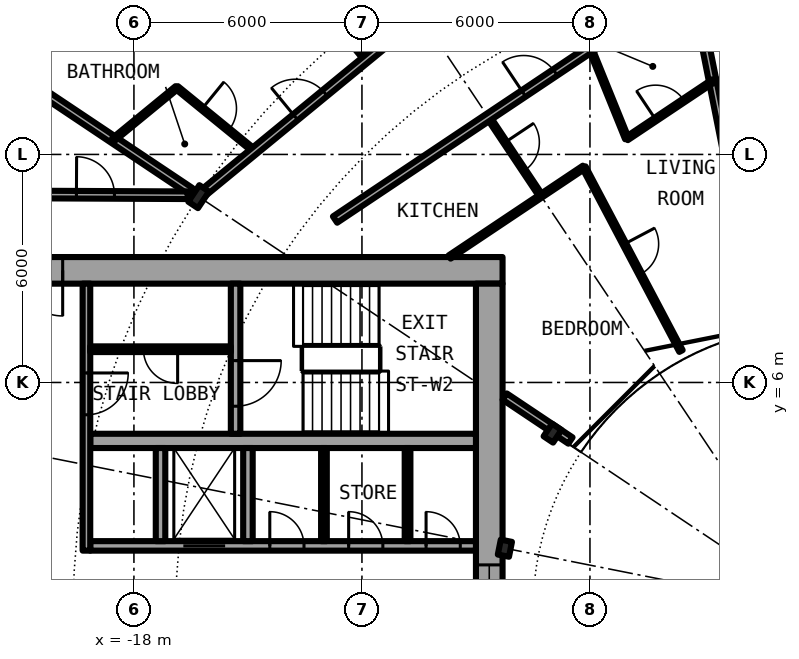
"""IFC4 building model, lengths in metres.
Left out: names, types, materials, properties, quantities, classifications, styles, units other than length and angle.
Written with IfcOpenShell. Run it as: python <this file> out.ifc"""

import sys

from ifc_helpers import new_model, si_unit, direction, frame, frame_2d, origin, origin_2d, place, context, subcontext, project, spatial, rectangle, i_section, extrude, element, fill, save


model = new_model("IFC4")
c1 = context("Model", 3, precision=1e-05, world=origin(), true_north=direction((0.0, 1.0)))
c2 = subcontext(c1, "Body", "Model", "MODEL_VIEW")
j1 = project(units=[si_unit("LENGTHUNIT", "METRE"), si_unit("PLANEANGLEUNIT", "RADIAN")], contexts=[c1])
p1 = place(None, origin())
s1 = spatial("IfcSite", under=j1, at=p1, CompositionType="ELEMENT")
p2 = place(p1, origin())
s2 = spatial("IfcBuilding", under=s1, at=p2, CompositionType="ELEMENT")
p3 = place(p2, frame((0.0, 0.0, 88.0)))
s3 = spatial("IfcBuildingStorey", under=s2, at=p3, CompositionType="ELEMENT", Elevation=88.0)
p4 = place(p3, frame((-16.297, 10.889, 0.0), z_axis=(0.0, 0.0, 1.0), x_axis=(-0.831469612303, 0.55557023302, 0.0)))
e1 = element("IfcColumn", 1, at=p4, inside=s3, PredefinedType="COLUMN", context=c2, shape_type="SweptSolid", body=[
    extrude(i_section(OverallWidth=0.306, OverallDepth=0.524, WebThickness=0.021, FlangeThickness=0.04, FilletRadius=0.027, at=origin_2d()), origin(), (0.0, 0.0, 1.0), 3.05),
])
for number, where, z_axis, x_axis in (
    (2, (-6.984, 4.667, 0.0), (0.0, 0.0, 1.0), (-0.831, 0.556, 0.0)),
    (3, (-8.239, 1.639, 0.0), (0.0, 0.0, 1.0), (-0.981, 0.195, 0.0)),
):
    element("IfcColumn", number, at=place(p3, frame(where, z_axis=z_axis, x_axis=x_axis)), inside=s3, PredefinedType="COLUMN", context=c2, shape_type="SweptSolid", body=[
        extrude(i_section(OverallWidth=0.3, OverallDepth=0.4, WebThickness=0.013, FlangeThickness=0.024, FilletRadius=0.027, at=origin_2d()), origin(), (0.0, 0.0, 1.0), 3.05),
    ])
p5 = place(p3, frame((-8.3, 8.95, 0.0), z_axis=(0.0, 0.0, 1.0), x_axis=(-1.0, 0.0, 0.0)))
e4 = element("IfcWall", 4, at=p5, inside=s3, PredefinedType="SHEAR", context=c2, shape_type="SweptSolid", body=[
    extrude(rectangle(XDim=14.0, YDim=0.7, at=frame_2d((7.0, 0.0))), origin(), (0.0, 0.0, 1.0), 3.05),
])
p6 = place(p5, frame((11.575, 0.0, 0.0)))
e5 = element("IfcOpeningElement", 5, at=p6, cuts=e4, PredefinedType="OPENING", context=c2, shape_type="SweptSolid", body=[
    extrude(rectangle(XDim=1.2, YDim=2.3, at=frame_2d((0.6, 1.15))), frame((0.0, 0.36, 0.0), z_axis=(0.0, -1.0, 0.0), x_axis=(1.0, 0.0, 0.0)), (0.0, 0.0, 1.0), 0.72),
])
p7 = place(p3, frame((-8.65, 8.6, 0.0), z_axis=(0.0, 0.0, 1.0), x_axis=(0.0, -1.0, 0.0)))
e6 = element("IfcWall", 6, at=p7, inside=s3, PredefinedType="SHEAR", context=c2, shape_type="SweptSolid", body=[
    extrude(rectangle(XDim=17.2, YDim=0.7, at=frame_2d((8.6, 0.0))), origin(), (0.0, 0.0, 1.0), 3.05),
])
p8 = place(p7, frame((7.4, 0.0, 0.1)))
e7 = element("IfcOpeningElement", 7, at=p8, cuts=e6, PredefinedType="OPENING", context=c2, shape_type="SweptSolid", body=[
    extrude(rectangle(XDim=2.4, YDim=2.2, at=frame_2d((1.2, 1.1))), frame((0.0, 0.36, 0.0), z_axis=(0.0, -1.0, 0.0), x_axis=(1.0, 0.0, 0.0)), (0.0, 0.0, 1.0), 0.72),
])
p9 = place(p3, frame((-19.15, 1.7, 0.0), z_axis=(0.0, 0.0, 1.0), x_axis=(1.0, 0.0, 0.0)))
e8 = element("IfcWall", 8, at=p9, inside=s3, PredefinedType="SHEAR", context=c2, shape_type="SweptSolid", body=[
    extrude(rectangle(XDim=10.15, YDim=0.25, at=frame_2d((5.075, 0.0))), origin(), (0.0, 0.0, 1.0), 3.05),
])
p10 = place(p9, frame((2.45, 0.0, 0.0)))
e9 = element("IfcOpeningElement", 9, at=p10, cuts=e8, PredefinedType="OPENING", context=c2, shape_type="SweptSolid", body=[
    extrude(rectangle(XDim=1.1, YDim=2.3, at=frame_2d((0.55, 1.15))), frame((0.0, 0.135, 0.0), z_axis=(0.0, -1.0, 0.0), x_axis=(1.0, 0.0, 0.0)), (0.0, 0.0, 1.0), 0.27),
])
p11 = place(p9, frame((8.837, 0.0, 0.0)))
e10 = element("IfcOpeningElement", 10, at=p11, cuts=e8, PredefinedType="OPENING", context=c2, shape_type="SweptSolid", body=[
    extrude(rectangle(XDim=0.9, YDim=2.3, at=frame_2d((0.45, 1.15))), frame((0.0, 0.135, 0.0), z_axis=(0.0, -1.0, 0.0), x_axis=(1.0, 0.0, 0.0)), (0.0, 0.0, 1.0), 0.27),
])
p12 = place(p9, frame((6.8, 0.0, 0.0)))
e11 = element("IfcOpeningElement", 11, at=p12, cuts=e8, PredefinedType="OPENING", context=c2, shape_type="SweptSolid", body=[
    extrude(rectangle(XDim=0.9, YDim=2.3, at=frame_2d((0.45, 1.15))), frame((0.0, 0.135, 0.0), z_axis=(0.0, -1.0, 0.0), x_axis=(1.0, 0.0, 0.0)), (0.0, 0.0, 1.0), 0.27),
])
p13 = place(p9, frame((4.725, 0.0, 0.0)))
e12 = element("IfcOpeningElement", 12, at=p13, cuts=e8, PredefinedType="OPENING", context=c2, shape_type="SweptSolid", body=[
    extrude(rectangle(XDim=0.9, YDim=2.3, at=frame_2d((0.45, 1.15))), frame((0.0, 0.135, 0.0), z_axis=(0.0, -1.0, 0.0), x_axis=(1.0, 0.0, 0.0)), (0.0, 0.0, 1.0), 0.27),
])
p14 = place(p3, frame((-9.0, 4.462, 0.0), z_axis=(0.0, 0.0, 1.0), x_axis=(-1.0, 0.0, 0.0)))
e13 = element("IfcWall", 13, at=p14, inside=s3, PredefinedType="SHEAR", context=c2, shape_type="SweptSolid", body=[
    extrude(rectangle(XDim=10.15, YDim=0.375, at=frame_2d((5.075, 0.0))), origin(), (0.0, 0.0, 1.0), 3.05),
])
p15 = place(p3, frame((-15.325, 8.6, 0.0), z_axis=(0.0, 0.0, 1.0), x_axis=(0.0, -1.0, 0.0)))
e14 = element("IfcWall", 14, at=p15, inside=s3, PredefinedType="SHEAR", context=c2, shape_type="SweptSolid", body=[
    extrude(rectangle(XDim=3.95, YDim=0.25, at=frame_2d((1.975, 0.0))), origin(), (0.0, 0.0, 1.0), 3.05),
])
p16 = place(p15, frame((2.025, 0.0, 0.0)))
e15 = element("IfcOpeningElement", 15, at=p16, cuts=e14, PredefinedType="OPENING", context=c2, shape_type="SweptSolid", body=[
    extrude(rectangle(XDim=1.2, YDim=2.3, at=frame_2d((0.6, 1.15))), frame((0.0, 0.135, 0.0), z_axis=(0.0, -1.0, 0.0), x_axis=(1.0, 0.0, 0.0)), (0.0, 0.0, 1.0), 0.27),
])
for number, where, z_axis, x_axis in (
    (16, (-15.0, 1.825, 0.0), (0.0, 0.0, 1.0), (0.0, 1.0, 0.0)),
    (17, (-17.3, 1.825, 0.0), (0.0, 0.0, 1.0), (0.0, 1.0, 0.0)),
):
    element("IfcWall", number, at=place(p3, frame(where, z_axis=z_axis, x_axis=x_axis)), inside=s3, PredefinedType="SOLIDWALL", context=c2, shape_type="SweptSolid", body=[
        extrude(rectangle(XDim=2.45, YDim=0.25, at=frame_2d((1.225, 0.0))), origin(), (0.0, 0.0, 1.0), 2.7),
    ])
p17 = place(p3, frame((-19.25, 8.6, 0.0), z_axis=(0.0, 0.0, 1.0), x_axis=(0.0, -1.0, 0.0)))
e18 = element("IfcWall", 18, at=p17, inside=s3, PredefinedType="SOLIDWALL", context=c2, shape_type="SweptSolid", body=[
    extrude(rectangle(XDim=7.025, YDim=0.2, at=frame_2d((3.513, 0.0))), origin(), (0.0, 0.0, 1.0), 2.7),
])
p18 = place(p17, frame((2.35, 0.0, 0.0)))
e19 = element("IfcOpeningElement", 19, at=p18, cuts=e18, PredefinedType="OPENING", context=c2, shape_type="SweptSolid", body=[
    extrude(rectangle(XDim=1.1, YDim=2.3, at=frame_2d((0.55, 1.15))), frame((0.0, 0.11, 0.0), z_axis=(0.0, -1.0, 0.0), x_axis=(1.0, 0.0, 0.0)), (0.0, 0.0, 1.0), 0.22),
])
for number, where, z_axis, x_axis in (
    (20, (-10.8, 1.825, 0.0), (0.0, 0.0, 1.0), (0.0, 1.0, 0.0)),
    (21, (-13.0, 1.825, 0.0), (0.0, 0.0, 1.0), (0.0, 1.0, 0.0)),
):
    element("IfcWall", number, at=place(p3, frame(where, z_axis=z_axis, x_axis=x_axis)), inside=s3, PredefinedType="PARTITIONING", context=c2, shape_type="SweptSolid", body=[
        extrude(rectangle(XDim=2.45, YDim=0.15, at=frame_2d((1.225, 0.0))), origin(), (0.0, 0.0, 1.0), 2.7),
    ])
p19 = place(p3, frame((-15.45, 6.875, 0.0), z_axis=(0.0, 0.0, 1.0), x_axis=(-1.0, 0.0, 0.0)))
e22 = element("IfcWall", 22, at=p19, inside=s3, PredefinedType="PARTITIONING", context=c2, shape_type="SweptSolid", body=[
    extrude(rectangle(XDim=3.7, YDim=0.15, at=frame_2d((1.85, 0.0))), origin(), (0.0, 0.0, 1.0), 2.7),
])
p20 = place(p19, frame((1.4, 0.0, 0.0)))
e23 = element("IfcOpeningElement", 23, at=p20, cuts=e22, PredefinedType="OPENING", context=c2, shape_type="SweptSolid", body=[
    extrude(rectangle(XDim=0.9, YDim=2.3, at=frame_2d((0.45, 1.15))), frame((0.0, 0.085, 0.0), z_axis=(0.0, -1.0, 0.0), x_axis=(1.0, 0.0, 0.0)), (0.0, 0.0, 1.0), 0.17),
])
p21 = place(p3, frame((-22.595, 15.098, 0.0), z_axis=(0.0, 0.0, 1.0), x_axis=(0.831382022135, -0.555701298605, 0.0)))
e24 = element("IfcWall", 24, at=p21, inside=s3, PredefinedType="PARTITIONING", context=c2, shape_type="SweptSolid", body=[
    extrude(rectangle(XDim=7.313, YDim=0.2, at=frame_2d((3.657, 0.0))), origin(), (0.0, 0.0, 1.0), 2.7),
])
p22 = place(p3, frame((-17.24, 21.007, 0.0), z_axis=(0.0, 0.0, 1.0), x_axis=(0.634396151441, -0.77300810024, 0.0)))
e25 = element("IfcWall", 25, at=p22, inside=s3, PredefinedType="PARTITIONING", context=c2, shape_type="SweptSolid", body=[
    extrude(rectangle(XDim=8.419, YDim=0.1, at=frame_2d((4.209, 0.0))), origin(), (0.0, 0.0, 1.0), 2.7),
])
p23 = place(p22, frame((6.679, 0.0, 0.0)))
e26 = element("IfcOpeningElement", 26, at=p23, cuts=e25, PredefinedType="OPENING", context=c2, shape_type="SweptSolid", body=[
    extrude(rectangle(XDim=0.9, YDim=2.3, at=frame_2d((0.45, 1.15))), frame((0.0, 0.06, 0.0), z_axis=(0.0, -1.0, 0.0), x_axis=(1.0, 0.0, 0.0)), (0.0, 0.0, 1.0), 0.12),
])
p24 = place(p22, frame((2.468, 0.0, 0.0)))
e27 = element("IfcOpeningElement", 27, at=p24, cuts=e25, PredefinedType="OPENING", context=c2, shape_type="SweptSolid", body=[
    extrude(rectangle(XDim=0.9, YDim=2.3, at=frame_2d((0.45, 1.15))), frame((0.0, 0.06, 0.0), z_axis=(0.0, -1.0, 0.0), x_axis=(1.0, 0.0, 0.0)), (0.0, 0.0, 1.0), 0.12),
])
p25 = place(p3, frame((-16.874, 13.758, 0.0), z_axis=(0.0, 0.0, 1.0), x_axis=(0.774979608522, -0.631986239072, 0.0)))
e28 = element("IfcWall", 28, at=p25, inside=s3, PredefinedType="PARTITIONING", context=c2, shape_type="SweptSolid", body=[
    extrude(rectangle(XDim=2.636, YDim=0.1, at=frame_2d((1.318, 0.0))), origin(), (0.0, 0.0, 1.0), 2.7),
])
p26 = place(p25, frame((0.868, 0.0, 0.0)))
e29 = element("IfcOpeningElement", 29, at=p26, cuts=e28, PredefinedType="OPENING", context=c2, shape_type="SweptSolid", body=[
    extrude(rectangle(XDim=0.9, YDim=2.3, at=frame_2d((0.45, 1.15))), frame((0.0, 0.06, 0.0), z_axis=(0.0, -1.0, 0.0), x_axis=(1.0, 0.0, 0.0)), (0.0, 0.0, 1.0), 0.12),
])
p27 = place(p3, frame((-8.674, 12.982, 0.0), z_axis=(0.0, 0.0, 1.0), x_axis=(0.555355163998, -0.831613276602, 0.0)))
e30 = element("IfcWall", 30, at=p27, inside=s3, PredefinedType="PARTITIONING", context=c2, shape_type="SweptSolid", body=[
    extrude(rectangle(XDim=2.494, YDim=0.1, at=frame_2d((1.247, 0.0))), origin(), (0.0, 0.0, 1.0), 2.7),
])
p28 = place(p27, frame((0.797, 0.0, 0.0)))
e31 = element("IfcOpeningElement", 31, at=p28, cuts=e30, PredefinedType="OPENING", context=c2, shape_type="SweptSolid", body=[
    extrude(rectangle(XDim=0.9, YDim=2.3, at=frame_2d((0.45, 1.15))), frame((0.0, 0.06, 0.0), z_axis=(0.0, -1.0, 0.0), x_axis=(1.0, 0.0, 0.0)), (0.0, 0.0, 1.0), 0.12),
])
p29 = place(p3, frame((-6.159, 11.663, 0.0), z_axis=(0.0, 0.0, 1.0), x_axis=(0.466976820365, -0.884269556889, 0.0)))
e32 = element("IfcWall", 32, at=p29, inside=s3, PredefinedType="PARTITIONING", context=c2, shape_type="SweptSolid", body=[
    extrude(rectangle(XDim=5.469, YDim=0.1, at=frame_2d((2.735, 0.0))), origin(), (0.0, 0.0, 1.0), 2.7),
])
p30 = place(p29, frame((2.284, 0.0, 0.0)))
e33 = element("IfcOpeningElement", 33, at=p30, cuts=e32, PredefinedType="OPENING", context=c2, shape_type="SweptSolid", body=[
    extrude(rectangle(XDim=0.9, YDim=2.3, at=frame_2d((0.45, 1.15))), frame((0.0, 0.06, 0.0), z_axis=(0.0, -1.0, 0.0), x_axis=(1.0, 0.0, 0.0)), (0.0, 0.0, 1.0), 0.12),
])
p31 = place(p3, frame((-5.986, 14.779, 0.0), z_axis=(0.0, 0.0, 1.0), x_axis=(0.375649498413, -0.926761811008, 0.0)))
e34 = element("IfcWall", 34, at=p31, inside=s3, PredefinedType="PARTITIONING", context=c2, shape_type="SweptSolid", body=[
    extrude(rectangle(XDim=2.548, YDim=0.1, at=frame_2d((1.274, 0.0))), origin(), (0.0, 0.0, 1.0), 2.7),
])
p32 = place(p3, frame((-3.297, 16.575, 0.0), z_axis=(0.0, 0.0, 1.0), x_axis=(0.195205282633, -0.980762406311, 0.0)))
e35 = element("IfcWall", 35, at=p32, inside=s3, PredefinedType="PARTITIONING", context=c2, shape_type="SweptSolid", body=[
    extrude(rectangle(XDim=8.3, YDim=0.2, at=frame_2d((4.15, 0.0))), origin(), (0.0, 0.0, 1.0), 2.7),
])
p33 = place(p3, frame((-6.513, 4.472, 0.0), z_axis=(0.0, 0.0, 1.0), x_axis=(-0.831382204863, 0.555701025225, 0.0)))
e36 = element("IfcWall", 36, at=p33, inside=s3, PredefinedType="PARTITIONING", context=c2, shape_type="SweptSolid", body=[
    extrude(rectangle(XDim=2.082, YDim=0.2, at=frame_2d((1.041, 0.0))), origin(), (0.0, 0.0, 1.0), 2.7),
])
p34 = place(p3, frame((-21.675, 10.95, 0.0), z_axis=(0.0, 0.0, 1.0), x_axis=(0.999988944514, -0.004702217579, 0.0)))
e37 = element("IfcWall", 37, at=p34, inside=s3, PredefinedType="PARTITIONING", context=c2, shape_type="SweptSolid", body=[
    extrude(rectangle(XDim=5.088, YDim=0.2, at=frame_2d((2.544, 0.0))), origin(), (0.0, 0.0, 1.0), 2.7),
])
p35 = place(p34, frame((2.162, 0.0, 0.0)))
e38 = element("IfcOpeningElement", 38, at=p35, cuts=e37, PredefinedType="OPENING", context=c2, shape_type="SweptSolid", body=[
    extrude(rectangle(XDim=1.0, YDim=2.3, at=frame_2d((0.5, 1.15))), frame((0.0, 0.11, 0.0), z_axis=(0.0, -1.0, 0.0), x_axis=(1.0, 0.0, 0.0)), (0.0, 0.0, 1.0), 0.22),
])
p36 = place(p3, frame((-9.695, 9.3, 0.0), z_axis=(0.0, 0.0, 1.0), x_axis=(0.831369521678, 0.555720000022, 0.0)))
e39 = element("IfcWall", 39, at=p36, inside=s3, PredefinedType="PARTITIONING", context=c2, shape_type="SweptSolid", body=[
    extrude(rectangle(XDim=4.252, YDim=0.1, at=frame_2d((2.126, 0.0))), origin(), (0.0, 0.0, 1.0), 2.7),
])
p37 = place(p3, frame((-5.032, 12.417, 0.0), z_axis=(0.0, 0.0, 1.0), x_axis=(0.831538390496, 0.555467285384, 0.0)))
e40 = element("IfcWall", 40, at=p37, inside=s3, PredefinedType="PARTITIONING", context=c2, shape_type="SweptSolid", body=[
    extrude(rectangle(XDim=2.717, YDim=0.1, at=frame_2d((1.358, 0.0))), origin(), (0.0, 0.0, 1.0), 2.7),
])
p38 = place(p37, frame((0.911, 0.0, 0.0)))
e41 = element("IfcOpeningElement", 41, at=p38, cuts=e40, PredefinedType="OPENING", context=c2, shape_type="SweptSolid", body=[
    extrude(rectangle(XDim=0.9, YDim=2.3, at=frame_2d((0.45, 1.15))), frame((0.0, 0.06, 0.0), z_axis=(0.0, -1.0, 0.0), x_axis=(1.0, 0.0, 0.0)), (0.0, 0.0, 1.0), 0.12),
])
p39 = place(p3, frame((-2.77, 13.926, 0.0), z_axis=(0.0, 0.0, 1.0), x_axis=(0.99880320044, -0.048909782152, 0.0)))
e42 = element("IfcWall", 42, at=p39, inside=s3, PredefinedType="PARTITIONING", context=c2, shape_type="SweptSolid", body=[
    extrude(rectangle(XDim=2.76, YDim=0.1, at=frame_2d((1.38, 0.0))), origin(), (0.0, 0.0, 1.0), 2.7),
])
p40 = place(p39, frame((0.93, 0.0, 0.0)))
e43 = element("IfcOpeningElement", 43, at=p40, cuts=e42, PredefinedType="OPENING", context=c2, shape_type="SweptSolid", body=[
    extrude(rectangle(XDim=0.9, YDim=2.3, at=frame_2d((0.45, 1.15))), frame((0.0, 0.06, 0.0), z_axis=(0.0, -1.0, 0.0), x_axis=(1.0, 0.0, 0.0)), (0.0, 0.0, 1.0), 0.12),
])
p41 = place(p3, frame((-12.708, 10.286, 0.0), z_axis=(0.0, 0.0, 1.0), x_axis=(0.831405725802, 0.555665834026, 0.0)))
e44 = element("IfcWall", 44, at=p41, inside=s3, PredefinedType="PARTITIONING", context=c2, shape_type="SweptSolid", body=[
    extrude(rectangle(XDim=11.314, YDim=0.2, at=frame_2d((5.657, 0.0))), origin(), (0.0, 0.0, 1.0), 2.7),
])
p42 = place(p41, frame((5.969, 0.0, 0.0)))
e45 = element("IfcOpeningElement", 45, at=p42, cuts=e44, PredefinedType="OPENING", context=c2, shape_type="SweptSolid", body=[
    extrude(rectangle(XDim=1.0, YDim=2.3, at=frame_2d((0.5, 1.15))), frame((0.0, 0.11, 0.0), z_axis=(0.0, -1.0, 0.0), x_axis=(1.0, 0.0, 0.0)), (0.0, 0.0, 1.0), 0.22),
])
p43 = place(p3, frame((-16.173, 10.991, 0.0), z_axis=(0.0, 0.0, 1.0), x_axis=(0.773049018445, 0.634346289562, 0.0)))
e46 = element("IfcWall", 46, at=p43, inside=s3, PredefinedType="PARTITIONING", context=c2, shape_type="SweptSolid", body=[
    extrude(rectangle(XDim=11.219, YDim=0.2, at=frame_2d((5.61, 0.0))), origin(), (0.0, 0.0, 1.0), 2.38),
])
p44 = place(p43, frame((3.135, 0.0, 0.0)))
e47 = element("IfcOpeningElement", 47, at=p44, cuts=e46, PredefinedType="OPENING", context=c2, shape_type="SweptSolid", body=[
    extrude(rectangle(XDim=1.0, YDim=2.3, at=frame_2d((0.5, 1.15))), frame((0.0, 0.11, 0.0), z_axis=(0.0, -1.0, 0.0), x_axis=(1.0, 0.0, 0.0)), (0.0, 0.0, 1.0), 0.22),
])
p45 = place(p3, frame((-18.542, 12.389, 0.0), z_axis=(0.0, 0.0, 1.0), x_axis=(0.772948171844, 0.634469166818, 0.0)))
e48 = element("IfcWall", 48, at=p45, inside=s3, PredefinedType="PARTITIONING", context=c2, shape_type="SweptSolid", body=[
    extrude(rectangle(XDim=2.158, YDim=0.1, at=frame_2d((1.079, 0.0))), origin(), (0.0, 0.0, 1.0), 2.7),
])
p46 = place(p10, origin())
e49 = element("IfcDoor", 49, at=p46, inside=s3, OperationType="DOUBLE_DOOR_SLIDING", PredefinedType="DOOR", context=c2, shape_type="SweptSolid", body=[
    extrude(rectangle(XDim=1.1, YDim=2.3, at=frame_2d((0.55, 1.15))), frame((0.0, 0.025, 0.0), z_axis=(0.0, -1.0, 0.0), x_axis=(1.0, 0.0, 0.0)), (0.0, 0.0, 1.0), 0.05),
])
fill(e9, e49)
p47 = place(p11, origin())
e50 = element("IfcDoor", 50, at=p47, inside=s3, OperationType="SINGLE_SWING_LEFT", PredefinedType="DOOR", context=c2, shape_type="SweptSolid", body=[
    extrude(rectangle(XDim=0.9, YDim=2.3, at=frame_2d((0.45, 1.15))), frame((0.0, 0.025, 0.0), z_axis=(0.0, -1.0, 0.0), x_axis=(1.0, 0.0, 0.0)), (0.0, 0.0, 1.0), 0.05),
])
fill(e10, e50)
p48 = place(p12, origin())
e51 = element("IfcDoor", 51, at=p48, inside=s3, OperationType="SINGLE_SWING_LEFT", PredefinedType="DOOR", context=c2, shape_type="SweptSolid", body=[
    extrude(rectangle(XDim=0.9, YDim=2.3, at=frame_2d((0.45, 1.15))), frame((0.0, 0.025, 0.0), z_axis=(0.0, -1.0, 0.0), x_axis=(1.0, 0.0, 0.0)), (0.0, 0.0, 1.0), 0.05),
])
fill(e11, e51)
p49 = place(p13, origin())
e52 = element("IfcDoor", 52, at=p49, inside=s3, OperationType="SINGLE_SWING_LEFT", PredefinedType="DOOR", context=c2, shape_type="SweptSolid", body=[
    extrude(rectangle(XDim=0.9, YDim=2.3, at=frame_2d((0.45, 1.15))), frame((0.0, 0.025, 0.0), z_axis=(0.0, -1.0, 0.0), x_axis=(1.0, 0.0, 0.0)), (0.0, 0.0, 1.0), 0.05),
])
fill(e12, e52)
p50 = place(p20, origin())
e53 = element("IfcDoor", 53, at=p50, inside=s3, OperationType="SINGLE_SWING_LEFT", PredefinedType="DOOR", context=c2, shape_type="SweptSolid", body=[
    extrude(rectangle(XDim=0.9, YDim=2.3, at=frame_2d((0.45, 1.15))), frame((0.0, 0.025, 0.0), z_axis=(0.0, -1.0, 0.0), x_axis=(1.0, 0.0, 0.0)), (0.0, 0.0, 1.0), 0.05),
])
fill(e23, e53)
p51 = place(p16, origin())
e54 = element("IfcDoor", 54, at=p51, inside=s3, OperationType="SINGLE_SWING_LEFT", PredefinedType="DOOR", context=c2, shape_type="SweptSolid", body=[
    extrude(rectangle(XDim=1.2, YDim=2.3, at=frame_2d((0.6, 1.15))), frame((0.0, 0.025, 0.0), z_axis=(0.0, -1.0, 0.0), x_axis=(1.0, 0.0, 0.0)), (0.0, 0.0, 1.0), 0.05),
])
fill(e15, e54)
p52 = place(p18, origin())
e55 = element("IfcDoor", 55, at=p52, inside=s3, OperationType="SINGLE_SWING_RIGHT", PredefinedType="DOOR", context=c2, shape_type="SweptSolid", body=[
    extrude(rectangle(XDim=1.1, YDim=2.3, at=frame_2d((0.55, 1.15))), frame((0.0, 0.025, 0.0), z_axis=(0.0, -1.0, 0.0), x_axis=(1.0, 0.0, 0.0)), (0.0, 0.0, 1.0), 0.05),
])
fill(e19, e55)
p53 = place(p6, origin())
e56 = element("IfcDoor", 56, at=p53, inside=s3, OperationType="SINGLE_SWING_LEFT", PredefinedType="DOOR", context=c2, shape_type="SweptSolid", body=[
    extrude(rectangle(XDim=1.2, YDim=2.3, at=frame_2d((0.6, 1.15))), frame((0.0, 0.025, 0.0), z_axis=(0.0, -1.0, 0.0), x_axis=(1.0, 0.0, 0.0)), (0.0, 0.0, 1.0), 0.05),
])
fill(e5, e56)
p54 = place(p8, origin())
e57 = element("IfcWindow", 57, at=p54, inside=s3, PartitioningType="SINGLE_PANEL", PredefinedType="WINDOW", context=c2, shape_type="SweptSolid", body=[
    extrude(rectangle(XDim=2.4, YDim=2.2, at=frame_2d((1.2, 1.1))), frame((0.0, 0.03, 0.0), z_axis=(0.0, -1.0, 0.0), x_axis=(1.0, 0.0, 0.0)), (0.0, 0.0, 1.0), 0.06),
])
fill(e7, e57)
p55 = place(p44, origin())
e58 = element("IfcDoor", 58, at=p55, inside=s3, OperationType="SINGLE_SWING_LEFT", PredefinedType="DOOR", context=c2, shape_type="SweptSolid", body=[
    extrude(rectangle(XDim=1.0, YDim=2.3, at=frame_2d((0.5, 1.15))), frame((0.0, 0.025, 0.0), z_axis=(0.0, -1.0, 0.0), x_axis=(1.0, 0.0, 0.0)), (0.0, 0.0, 1.0), 0.05),
])
fill(e47, e58)
p56 = place(p26, origin())
e59 = element("IfcDoor", 59, at=p56, inside=s3, OperationType="SINGLE_SWING_LEFT", PredefinedType="DOOR", context=c2, shape_type="SweptSolid", body=[
    extrude(rectangle(XDim=0.9, YDim=2.3, at=frame_2d((0.45, 1.15))), frame((0.0, 0.025, 0.0), z_axis=(0.0, -1.0, 0.0), x_axis=(1.0, 0.0, 0.0)), (0.0, 0.0, 1.0), 0.05),
])
fill(e29, e59)
p57 = place(p42, origin())
e60 = element("IfcDoor", 60, at=p57, inside=s3, OperationType="SINGLE_SWING_RIGHT", PredefinedType="DOOR", context=c2, shape_type="SweptSolid", body=[
    extrude(rectangle(XDim=1.0, YDim=2.3, at=frame_2d((0.5, 1.15))), frame((0.0, 0.025, 0.0), z_axis=(0.0, -1.0, 0.0), x_axis=(1.0, 0.0, 0.0)), (0.0, 0.0, 1.0), 0.05),
])
fill(e45, e60)
p58 = place(p38, origin())
e61 = element("IfcDoor", 61, at=p58, inside=s3, OperationType="SINGLE_SWING_RIGHT", PredefinedType="DOOR", context=c2, shape_type="SweptSolid", body=[
    extrude(rectangle(XDim=0.9, YDim=2.3, at=frame_2d((0.45, 1.15))), frame((0.0, 0.025, 0.0), z_axis=(0.0, -1.0, 0.0), x_axis=(1.0, 0.0, 0.0)), (0.0, 0.0, 1.0), 0.05),
])
fill(e41, e61)
p59 = place(p28, origin())
e62 = element("IfcDoor", 62, at=p59, inside=s3, OperationType="SINGLE_SWING_RIGHT", PredefinedType="DOOR", context=c2, shape_type="SweptSolid", body=[
    extrude(rectangle(XDim=0.9, YDim=2.3, at=frame_2d((0.45, 1.15))), frame((0.0, 0.025, 0.0), z_axis=(0.0, -1.0, 0.0), x_axis=(1.0, 0.0, 0.0)), (0.0, 0.0, 1.0), 0.05),
])
fill(e31, e62)
p60 = place(p30, origin())
e63 = element("IfcDoor", 63, at=p60, inside=s3, OperationType="SINGLE_SWING_RIGHT", PredefinedType="DOOR", context=c2, shape_type="SweptSolid", body=[
    extrude(rectangle(XDim=0.9, YDim=2.3, at=frame_2d((0.45, 1.15))), frame((0.0, 0.025, 0.0), z_axis=(0.0, -1.0, 0.0), x_axis=(1.0, 0.0, 0.0)), (0.0, 0.0, 1.0), 0.05),
])
fill(e33, e63)
p61 = place(p35, origin())
e64 = element("IfcDoor", 64, at=p61, inside=s3, OperationType="SINGLE_SWING_RIGHT", PredefinedType="DOOR", context=c2, shape_type="SweptSolid", body=[
    extrude(rectangle(XDim=1.0, YDim=2.3, at=frame_2d((0.5, 1.15))), frame((0.0, 0.025, 0.0), z_axis=(0.0, -1.0, 0.0), x_axis=(1.0, 0.0, 0.0)), (0.0, 0.0, 1.0), 0.05),
])
fill(e38, e64)
save(model, sys.argv[1])
